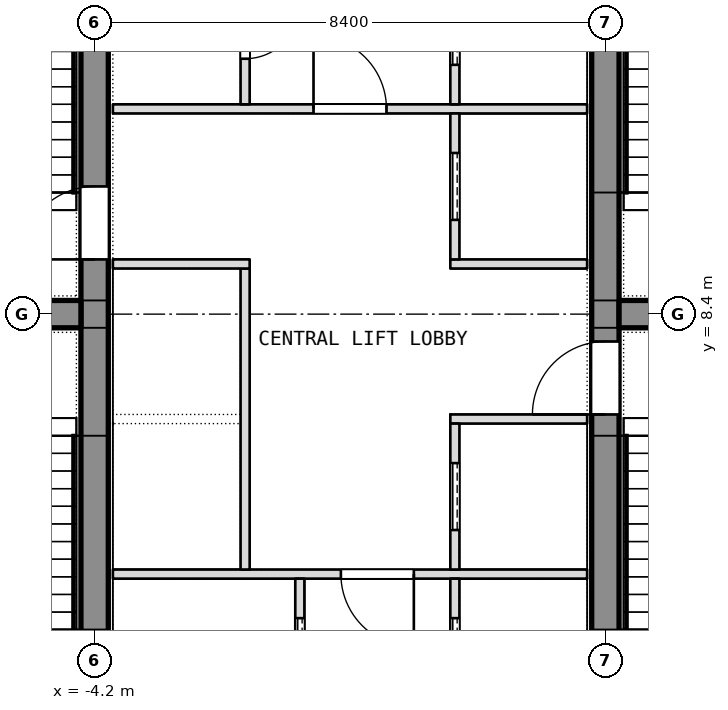
"""IFC4 building model, lengths in metres.
Left out: names, types, materials, properties, quantities, classifications, styles, units other than length and angle.
Written with IfcOpenShell. Run it as: python <this file> out.ifc"""

import sys

from ifc_helpers import new_model, si_unit, direction, frame, frame_2d, origin, place, context, subcontext, project, spatial, rectangle, extrude, element, fill, save


model = new_model("IFC4")
c1 = context("Model", 3, precision=1e-05, world=origin(), true_north=direction((0.0, 1.0)))
c2 = subcontext(c1, "Body", "Model", "MODEL_VIEW")
j1 = project(units=[si_unit("LENGTHUNIT", "METRE"), si_unit("PLANEANGLEUNIT", "RADIAN")], contexts=[c1])
p1 = place(None, origin())
s1 = spatial("IfcSite", under=j1, at=p1, CompositionType="ELEMENT")
p2 = place(p1, origin())
s2 = spatial("IfcBuilding", under=s1, at=p2, CompositionType="ELEMENT")
p3 = place(p2, frame((0.0, 0.0, 97.7)))
s3 = spatial("IfcBuildingStorey", under=s2, at=p3, CompositionType="ELEMENT", Elevation=97.7)
p4 = place(p3, frame((-4.2, 1.0, 0.0), z_axis=(0.0, 0.0, 1.0), x_axis=(0.0, 1.0, 0.0)))
e1 = element("IfcWall", 1, at=p4, inside=s3, PredefinedType="SHEAR", context=c2, shape_type="SweptSolid", body=[
    extrude(rectangle(XDim=14.8, YDim=0.45, at=frame_2d((7.4, 0.0))), origin(), (0.0, 0.0, 1.0), 7.2),
])
p5 = place(p4, frame((8.3, 0.0, 0.0)))
e2 = element("IfcOpeningElement", 2, at=p5, cuts=e1, PredefinedType="OPENING", context=c2, shape_type="SweptSolid", body=[
    extrude(rectangle(XDim=1.2, YDim=2.1, at=frame_2d((0.6, 1.05))), frame((0.0, 0.225, 0.0), z_axis=(0.0, -1.0, 0.0), x_axis=(1.0, 0.0, 0.0)), (0.0, 0.0, 1.0), 0.45),
])
p6 = place(p3, frame((4.2, 1.0, 0.0), z_axis=(0.0, 0.0, 1.0), x_axis=(0.0, 1.0, 0.0)))
e3 = element("IfcWall", 3, at=p6, inside=s3, PredefinedType="SHEAR", context=c2, shape_type="SweptSolid", body=[
    extrude(rectangle(XDim=14.8, YDim=0.45, at=frame_2d((7.4, 0.0))), origin(), (0.0, 0.0, 1.0), 7.2),
])
p7 = place(p6, frame((5.75, 0.0, 0.0)))
e4 = element("IfcOpeningElement", 4, at=p7, cuts=e3, PredefinedType="OPENING", context=c2, shape_type="SweptSolid", body=[
    extrude(rectangle(XDim=1.2, YDim=2.1, at=frame_2d((0.6, 1.05))), frame((0.0, 0.225, 0.0), z_axis=(0.0, -1.0, 0.0), x_axis=(1.0, 0.0, 0.0)), (0.0, 0.0, 1.0), 0.45),
])
for number, where, z_axis, x_axis in (
    (5, (-11.1, 8.4, 0.0), (0.0, 0.0, 1.0), (1.0, 0.0, 0.0)),
    (6, (4.425, 8.4, 0.0), (0.0, 0.0, 1.0), (1.0, 0.0, 0.0)),
):
    element("IfcWall", number, at=place(p3, frame(where, z_axis=z_axis, x_axis=x_axis)), inside=s3, PredefinedType="SHEAR", context=c2, shape_type="SweptSolid", body=[
        extrude(rectangle(XDim=6.675, YDim=0.45, at=frame_2d((3.337, 0.0))), origin(), (0.0, 0.0, 1.0), 7.2),
    ])
p8 = place(p3, frame((-3.9, 4.125, 0.0), z_axis=(0.0, 0.0, 1.0), x_axis=(1.0, 0.0, 0.0)))
e7 = element("IfcWall", 7, at=p8, inside=s3, PredefinedType="PARTITIONING", context=c2, shape_type="SweptSolid", body=[
    extrude(rectangle(XDim=7.8, YDim=0.15, at=frame_2d((3.9, 0.0))), origin(), (0.0, 0.0, 1.0), 6.94),
])
p9 = place(p8, frame((3.75, 0.0, 0.0)))
e8 = element("IfcOpeningElement", 8, at=p9, cuts=e7, PredefinedType="OPENING", context=c2, shape_type="SweptSolid", body=[
    extrude(rectangle(XDim=1.2, YDim=2.1, at=frame_2d((0.6, 1.05))), frame((0.0, 0.075, 0.0), z_axis=(0.0, -1.0, 0.0), x_axis=(1.0, 0.0, 0.0)), (0.0, 0.0, 1.0), 0.15),
])
p10 = place(p3, frame((-3.9, 11.775, 0.0), z_axis=(0.0, 0.0, 1.0), x_axis=(1.0, 0.0, 0.0)))
e9 = element("IfcWall", 9, at=p10, inside=s3, PredefinedType="PARTITIONING", context=c2, shape_type="SweptSolid", body=[
    extrude(rectangle(XDim=7.8, YDim=0.15, at=frame_2d((3.9, 0.0))), origin(), (0.0, 0.0, 1.0), 6.94),
])
p11 = place(p10, frame((3.3, 0.0, 0.0)))
e10 = element("IfcOpeningElement", 10, at=p11, cuts=e9, PredefinedType="OPENING", context=c2, shape_type="SweptSolid", body=[
    extrude(rectangle(XDim=1.2, YDim=2.1, at=frame_2d((0.6, 1.05))), frame((0.0, 0.075, 0.0), z_axis=(0.0, -1.0, 0.0), x_axis=(1.0, 0.0, 0.0)), (0.0, 0.0, 1.0), 0.15),
])
p12 = place(p3, frame((-0.825, 1.5, 0.0), z_axis=(0.0, 0.0, 1.0), x_axis=(0.0, 1.0, 0.0)))
e11 = element("IfcWall", 11, at=p12, inside=s3, PredefinedType="SHEAR", context=c2, shape_type="SweptSolid", body=[
    extrude(rectangle(XDim=2.55, YDim=0.15, at=frame_2d((1.275, 0.0))), origin(), (0.0, 0.0, 1.0), 7.2),
])
p13 = place(p12, frame((0.8, 0.0, 0.0)))
e12 = element("IfcOpeningElement", 12, at=p13, cuts=e11, PredefinedType="OPENING", context=c2, shape_type="SweptSolid", body=[
    extrude(rectangle(XDim=1.1, YDim=2.1, at=frame_2d((0.55, 1.05))), frame((0.0, 0.075, 0.0), z_axis=(0.0, -1.0, 0.0), x_axis=(1.0, 0.0, 0.0)), (0.0, 0.0, 1.0), 0.15),
])
p14 = place(p3, frame((-1.725, 4.2, 0.0), z_axis=(0.0, 0.0, 1.0), x_axis=(0.0, 1.0, 0.0)))
e13 = element("IfcWall", 13, at=p14, inside=s3, PredefinedType="SHEAR", context=c2, shape_type="SweptSolid", body=[
    extrude(rectangle(XDim=4.95, YDim=0.15, at=frame_2d((2.475, 0.0))), origin(), (0.0, 0.0, 1.0), 7.2),
])
p15 = place(p3, frame((-3.9, 9.225, 0.0), z_axis=(0.0, 0.0, 1.0), x_axis=(1.0, 0.0, 0.0)))
e14 = element("IfcWall", 14, at=p15, inside=s3, PredefinedType="SHEAR", context=c2, shape_type="SweptSolid", body=[
    extrude(rectangle(XDim=2.25, YDim=0.15, at=frame_2d((1.125, 0.0))), origin(), (0.0, 0.0, 1.0), 7.2),
])
p16 = place(p3, frame((-1.725, 11.85, 0.0), z_axis=(0.0, 0.0, 1.0), x_axis=(0.0, 1.0, 0.0)))
e15 = element("IfcWall", 15, at=p16, inside=s3, PredefinedType="PARTITIONING", context=c2, shape_type="SweptSolid", body=[
    extrude(rectangle(XDim=2.4, YDim=0.15, at=frame_2d((1.2, 0.0))), origin(), (0.0, 0.0, 1.0), 6.94),
])
p17 = place(p16, frame((0.75, 0.0, 0.0)))
e16 = element("IfcOpeningElement", 16, at=p17, cuts=e15, PredefinedType="OPENING", context=c2, shape_type="SweptSolid", body=[
    extrude(rectangle(XDim=0.9, YDim=2.1, at=frame_2d((0.45, 1.05))), frame((0.0, 0.075, 0.0), z_axis=(0.0, -1.0, 0.0), x_axis=(1.0, 0.0, 0.0)), (0.0, 0.0, 1.0), 0.15),
])
p18 = place(p3, frame((1.725, 1.65, 0.0), z_axis=(0.0, 0.0, 1.0), x_axis=(0.0, 1.0, 0.0)))
e17 = element("IfcWall", 17, at=p18, inside=s3, PredefinedType="SHEAR", context=c2, shape_type="SweptSolid", body=[
    extrude(rectangle(XDim=2.4, YDim=0.15, at=frame_2d((1.2, 0.0))), origin(), (0.0, 0.0, 1.0), 7.2),
])
p19 = place(p18, frame((0.65, 0.0, 0.0)))
e18 = element("IfcOpeningElement", 18, at=p19, cuts=e17, PredefinedType="OPENING", context=c2, shape_type="SweptSolid", body=[
    extrude(rectangle(XDim=1.1, YDim=2.1, at=frame_2d((0.55, 1.05))), frame((0.0, 0.075, 0.0), z_axis=(0.0, -1.0, 0.0), x_axis=(1.0, 0.0, 0.0)), (0.0, 0.0, 1.0), 0.15),
])
p20 = place(p3, frame((1.725, 11.85, 0.0), z_axis=(0.0, 0.0, 1.0), x_axis=(0.0, 1.0, 0.0)))
e19 = element("IfcWall", 19, at=p20, inside=s3, PredefinedType="SHEAR", context=c2, shape_type="SweptSolid", body=[
    extrude(rectangle(XDim=2.4, YDim=0.15, at=frame_2d((1.2, 0.0))), origin(), (0.0, 0.0, 1.0), 7.2),
])
p21 = place(p20, frame((0.65, 0.0, 0.0)))
e20 = element("IfcOpeningElement", 20, at=p21, cuts=e19, PredefinedType="OPENING", context=c2, shape_type="SweptSolid", body=[
    extrude(rectangle(XDim=1.1, YDim=2.1, at=frame_2d((0.55, 1.05))), frame((0.0, 0.075, 0.0), z_axis=(0.0, -1.0, 0.0), x_axis=(1.0, 0.0, 0.0)), (0.0, 0.0, 1.0), 0.15),
])
for number, where, z_axis, x_axis in (
    (21, (1.65, 6.675, 0.0), (0.0, 0.0, 1.0), (1.0, 0.0, 0.0)),
    (22, (1.65, 9.225, 0.0), (0.0, 0.0, 1.0), (1.0, 0.0, 0.0)),
):
    element("IfcWall", number, at=place(p3, frame(where, z_axis=z_axis, x_axis=x_axis)), inside=s3, PredefinedType="SHEAR", context=c2, shape_type="SweptSolid", body=[
        extrude(rectangle(XDim=2.25, YDim=0.15, at=frame_2d((1.125, 0.0))), origin(), (0.0, 0.0, 1.0), 7.2),
    ])
p22 = place(p3, frame((1.725, 4.2, 0.0), z_axis=(0.0, 0.0, 1.0), x_axis=(0.0, 1.0, 0.0)))
e23 = element("IfcWall", 23, at=p22, inside=s3, PredefinedType="SHEAR", context=c2, shape_type="SweptSolid", body=[
    extrude(rectangle(XDim=2.4, YDim=0.15, at=frame_2d((1.2, 0.0))), origin(), (0.0, 0.0, 1.0), 7.2),
])
p23 = place(p22, frame((0.65, 0.0, 0.0)))
e24 = element("IfcOpeningElement", 24, at=p23, cuts=e23, PredefinedType="OPENING", context=c2, shape_type="SweptSolid", body=[
    extrude(rectangle(XDim=1.1, YDim=2.1, at=frame_2d((0.55, 1.05))), frame((0.0, 0.075, 0.0), z_axis=(0.0, -1.0, 0.0), x_axis=(1.0, 0.0, 0.0)), (0.0, 0.0, 1.0), 0.15),
])
p24 = place(p3, frame((1.725, 9.3, 0.0), z_axis=(0.0, 0.0, 1.0), x_axis=(0.0, 1.0, 0.0)))
e25 = element("IfcWall", 25, at=p24, inside=s3, PredefinedType="SHEAR", context=c2, shape_type="SweptSolid", body=[
    extrude(rectangle(XDim=2.4, YDim=0.15, at=frame_2d((1.2, 0.0))), origin(), (0.0, 0.0, 1.0), 7.2),
])
p25 = place(p24, frame((0.65, 0.0, 0.0)))
e26 = element("IfcOpeningElement", 26, at=p25, cuts=e25, PredefinedType="OPENING", context=c2, shape_type="SweptSolid", body=[
    extrude(rectangle(XDim=1.1, YDim=2.1, at=frame_2d((0.55, 1.05))), frame((0.0, 0.075, 0.0), z_axis=(0.0, -1.0, 0.0), x_axis=(1.0, 0.0, 0.0)), (0.0, 0.0, 1.0), 0.15),
])
p26 = place(p13, origin())
e27 = element("IfcDoor", 27, at=p26, inside=s3, OperationType="SLIDING_TO_LEFT", PredefinedType="DOOR", context=c2, shape_type="SweptSolid", body=[
    extrude(rectangle(XDim=1.1, YDim=2.1, at=frame_2d((0.55, 1.05))), frame((0.0, 0.025, 0.0), z_axis=(0.0, -1.0, 0.0), x_axis=(1.0, 0.0, 0.0)), (0.0, 0.0, 1.0), 0.05),
])
fill(e12, e27)
p27 = place(p19, origin())
e28 = element("IfcDoor", 28, at=p27, inside=s3, OperationType="SLIDING_TO_LEFT", PredefinedType="DOOR", context=c2, shape_type="SweptSolid", body=[
    extrude(rectangle(XDim=1.1, YDim=2.1, at=frame_2d((0.55, 1.05))), frame((0.0, 0.025, 0.0), z_axis=(0.0, -1.0, 0.0), x_axis=(1.0, 0.0, 0.0)), (0.0, 0.0, 1.0), 0.05),
])
fill(e18, e28)
p28 = place(p23, origin())
e29 = element("IfcDoor", 29, at=p28, inside=s3, OperationType="SLIDING_TO_LEFT", PredefinedType="DOOR", context=c2, shape_type="SweptSolid", body=[
    extrude(rectangle(XDim=1.1, YDim=2.1, at=frame_2d((0.55, 1.05))), frame((0.0, 0.025, 0.0), z_axis=(0.0, -1.0, 0.0), x_axis=(1.0, 0.0, 0.0)), (0.0, 0.0, 1.0), 0.05),
])
fill(e24, e29)
p29 = place(p25, origin())
e30 = element("IfcDoor", 30, at=p29, inside=s3, OperationType="SLIDING_TO_LEFT", PredefinedType="DOOR", context=c2, shape_type="SweptSolid", body=[
    extrude(rectangle(XDim=1.1, YDim=2.1, at=frame_2d((0.55, 1.05))), frame((0.0, 0.025, 0.0), z_axis=(0.0, -1.0, 0.0), x_axis=(1.0, 0.0, 0.0)), (0.0, 0.0, 1.0), 0.05),
])
fill(e26, e30)
p30 = place(p21, origin())
e31 = element("IfcDoor", 31, at=p30, inside=s3, OperationType="SLIDING_TO_LEFT", PredefinedType="DOOR", context=c2, shape_type="SweptSolid", body=[
    extrude(rectangle(XDim=1.1, YDim=2.1, at=frame_2d((0.55, 1.05))), frame((0.0, 0.025, 0.0), z_axis=(0.0, -1.0, 0.0), x_axis=(1.0, 0.0, 0.0)), (0.0, 0.0, 1.0), 0.05),
])
fill(e20, e31)
p31 = place(p9, origin())
e32 = element("IfcDoor", 32, at=p31, inside=s3, OperationType="SINGLE_SWING_LEFT", PredefinedType="DOOR", context=c2, shape_type="SweptSolid", body=[
    extrude(rectangle(XDim=1.2, YDim=2.1, at=frame_2d((0.6, 1.05))), frame((0.0, 0.025, 0.0), z_axis=(0.0, -1.0, 0.0), x_axis=(1.0, 0.0, 0.0)), (0.0, 0.0, 1.0), 0.05),
])
fill(e8, e32)
p32 = place(p11, origin())
e33 = element("IfcDoor", 33, at=p32, inside=s3, OperationType="SINGLE_SWING_LEFT", PredefinedType="DOOR", context=c2, shape_type="SweptSolid", body=[
    extrude(rectangle(XDim=1.2, YDim=2.1, at=frame_2d((0.6, 1.05))), frame((0.0, 0.025, 0.0), z_axis=(0.0, -1.0, 0.0), x_axis=(1.0, 0.0, 0.0)), (0.0, 0.0, 1.0), 0.05),
])
fill(e10, e33)
p33 = place(p17, origin())
e34 = element("IfcDoor", 34, at=p33, inside=s3, OperationType="SINGLE_SWING_LEFT", PredefinedType="DOOR", context=c2, shape_type="SweptSolid", body=[
    extrude(rectangle(XDim=0.9, YDim=2.1, at=frame_2d((0.45, 1.05))), frame((0.0, 0.025, 0.0), z_axis=(0.0, -1.0, 0.0), x_axis=(1.0, 0.0, 0.0)), (0.0, 0.0, 1.0), 0.05),
])
fill(e16, e34)
p34 = place(p5, origin())
e35 = element("IfcDoor", 35, at=p34, inside=s3, OperationType="SINGLE_SWING_LEFT", PredefinedType="DOOR", context=c2, shape_type="SweptSolid", body=[
    extrude(rectangle(XDim=1.2, YDim=2.1, at=frame_2d((0.6, 1.05))), frame((0.0, 0.025, 0.0), z_axis=(0.0, -1.0, 0.0), x_axis=(1.0, 0.0, 0.0)), (0.0, 0.0, 1.0), 0.05),
])
fill(e2, e35)
p35 = place(p7, origin())
e36 = element("IfcDoor", 36, at=p35, inside=s3, OperationType="SINGLE_SWING_LEFT", PredefinedType="DOOR", context=c2, shape_type="SweptSolid", body=[
    extrude(rectangle(XDim=1.2, YDim=2.1, at=frame_2d((0.6, 1.05))), frame((0.0, 0.025, 0.0), z_axis=(0.0, -1.0, 0.0), x_axis=(1.0, 0.0, 0.0)), (0.0, 0.0, 1.0), 0.05),
])
fill(e4, e36)
save(model, sys.argv[1])
